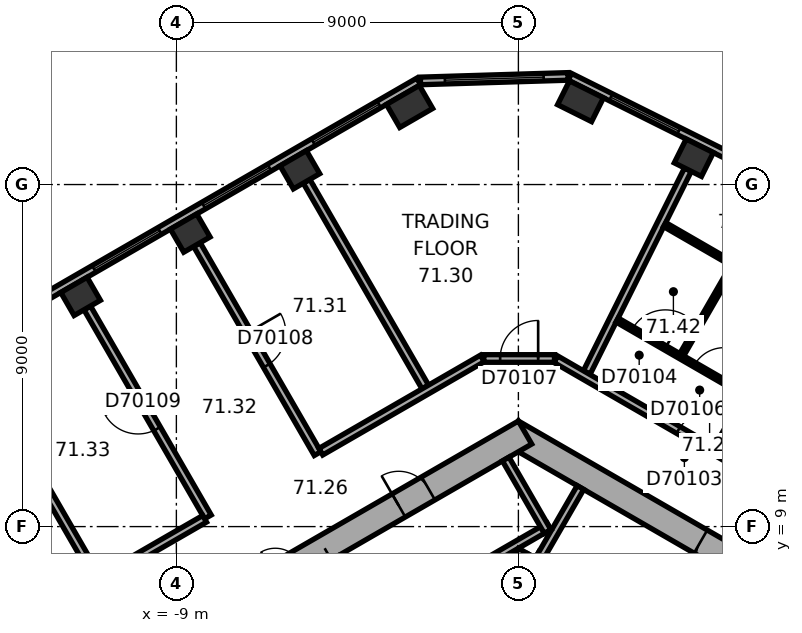
"""IFC4 building model, lengths in metres.
Left out: names, types, materials, properties, quantities, classifications, styles, units other than length and angle.
Written with IfcOpenShell. Run it as: python <this file> out.ifc"""

import sys

from ifc_helpers import new_model, si_unit, direction, frame, frame_2d, origin, origin_2d, place, context, subcontext, project, spatial, rectangle, extrude, element, fill, save


model = new_model("IFC4")
c1 = context("Model", 3, precision=1e-05, world=origin(), true_north=direction((0.0, 1.0)))
c2 = subcontext(c1, "Body", "Model", "MODEL_VIEW")
j1 = project(units=[si_unit("LENGTHUNIT", "METRE"), si_unit("PLANEANGLEUNIT", "RADIAN")], contexts=[c1])
p1 = place(None, origin())
s1 = spatial("IfcSite", under=j1, at=p1, CompositionType="ELEMENT")
p2 = place(p1, origin())
s2 = spatial("IfcBuilding", under=s1, at=p2, CompositionType="ELEMENT")
p3 = place(p2, frame((0.0, 0.0, 289.4)))
s3 = spatial("IfcBuildingStorey", under=s2, at=p3, CompositionType="ELEMENT", Elevation=289.4)
p4 = place(p3, frame((4.616, 18.706, 0.0), z_axis=(0.0, 0.0, 1.0), x_axis=(-0.894934361602, 0.44619781311, 0.0)))
e1 = element("IfcColumn", 1, at=p4, inside=s3, PredefinedType="COLUMN", context=c2, shape_type="SweptSolid", body=[
    extrude(rectangle(XDim=0.8, YDim=0.7, at=origin_2d()), origin(), (0.0, 0.0, 1.0), 3.7),
])
for number, where, z_axis, x_axis in (
    (2, (1.635, 20.192, 0.0), (0.0, 0.0, 1.0), (-0.895, 0.446, 0.0)),
    (3, (-2.864, 20.055, 0.0), (0.0, 0.0, 1.0), (-0.866, -0.5, 0.0)),
):
    element("IfcColumn", number, at=place(p3, frame(where, z_axis=z_axis, x_axis=x_axis)), inside=s3, PredefinedType="COLUMN", context=c2, shape_type="SweptSolid", body=[
        extrude(rectangle(XDim=1.0, YDim=0.7, at=origin_2d()), origin(), (0.0, 0.0, 1.0), 3.7),
    ])
for number, where, z_axis, x_axis in (
    (4, (-5.75, 18.389, 0.0), (0.0, 0.0, 1.0), (-0.866, -0.5, 0.0)),
    (5, (-8.635, 16.723, 0.0), (0.0, 0.0, 1.0), (-0.866, -0.5, 0.0)),
    (6, (-11.52, 15.057, 0.0), (0.0, 0.0, 1.0), (-0.866, -0.5, 0.0)),
):
    element("IfcColumn", number, at=place(p3, frame(where, z_axis=z_axis, x_axis=x_axis)), inside=s3, PredefinedType="COLUMN", context=c2, shape_type="SweptSolid", body=[
        extrude(rectangle(XDim=0.8, YDim=0.7, at=origin_2d()), origin(), (0.0, 0.0, 1.0), 3.7),
    ])
p5 = place(p3, frame((10.025, 5.586, 0.0), z_axis=(0.0, 0.0, 1.0), x_axis=(-0.866026453023, 0.499998182661, 0.0)))
e7 = element("IfcWall", 7, at=p5, inside=s3, PredefinedType="SHEAR", context=c2, shape_type="SweptSolid", body=[
    extrude(rectangle(XDim=11.778, YDim=0.7, at=frame_2d((5.889, 0.0))), origin(), (0.0, 0.0, 1.0), 3.7),
])
p6 = place(p5, frame((5.139, 0.0, 0.0)))
e8 = element("IfcOpeningElement", 8, at=p6, cuts=e7, PredefinedType="OPENING", context=c2, shape_type="SweptSolid", body=[
    extrude(rectangle(XDim=0.9, YDim=2.1, at=frame_2d((0.45, 1.05))), frame((0.0, 0.36, 0.0), z_axis=(0.0, -1.0, 0.0), x_axis=(1.0, 0.0, 0.0)), (0.0, 0.0, 1.0), 0.72),
])
p7 = place(p3, frame((0.175, 11.475, 0.0), z_axis=(0.0, 0.0, 1.0), x_axis=(-0.866026453023, -0.499998182661, 0.0)))
e9 = element("IfcWall", 9, at=p7, inside=s3, PredefinedType="SHEAR", context=c2, shape_type="SweptSolid", body=[
    extrude(rectangle(XDim=11.778, YDim=0.7, at=frame_2d((5.889, 0.0))), origin(), (0.0, 0.0, 1.0), 3.7),
])
p8 = place(p7, frame((6.089, 0.0, 0.0)))
e10 = element("IfcOpeningElement", 10, at=p8, cuts=e9, PredefinedType="OPENING", context=c2, shape_type="SweptSolid", body=[
    extrude(rectangle(XDim=1.5, YDim=2.1, at=frame_2d((0.75, 1.05))), frame((0.0, 0.36, 0.0), z_axis=(0.0, -1.0, 0.0), x_axis=(1.0, 0.0, 0.0)), (0.0, 0.0, 1.0), 0.72),
])
p9 = place(p7, frame((2.939, 0.0, 0.0)))
e11 = element("IfcOpeningElement", 11, at=p9, cuts=e9, PredefinedType="OPENING", context=c2, shape_type="SweptSolid", body=[
    extrude(rectangle(XDim=0.9, YDim=2.1, at=frame_2d((0.45, 1.05))), frame((0.0, 0.36, 0.0), z_axis=(0.0, -1.0, 0.0), x_axis=(1.0, 0.0, 0.0)), (0.0, 0.0, 1.0), 0.72),
])
p10 = place(p3, frame((17.223, 12.923, 0.0), z_axis=(0.0, 0.0, 1.0), x_axis=(-0.894930561148, 0.44620543556, 0.0)))
e12 = element("IfcWall", 12, at=p10, inside=s3, PredefinedType="STANDARD", context=c2, shape_type="SweptSolid", body=[
    extrude(rectangle(XDim=17.731, YDim=0.2, at=frame_2d((8.866, 0.0))), origin(), (0.0, 0.0, 1.0), 3.7),
])
p11 = place(p10, frame((1.202, 0.0, 0.9)))
e13 = element("IfcOpeningElement", 13, at=p11, cuts=e12, PredefinedType="OPENING", context=c2, shape_type="SweptSolid", body=[
    extrude(rectangle(XDim=2.0, YDim=2.0, at=frame_2d((1.0, 1.0))), frame((0.0, 0.11, 0.0), z_axis=(0.0, -1.0, 0.0), x_axis=(1.0, 0.0, 0.0)), (0.0, 0.0, 1.0), 0.22),
])
p12 = place(p10, frame((4.533, 0.0, 0.9)))
e14 = element("IfcOpeningElement", 14, at=p12, cuts=e12, PredefinedType="OPENING", context=c2, shape_type="SweptSolid", body=[
    extrude(rectangle(XDim=2.0, YDim=2.0, at=frame_2d((1.0, 1.0))), frame((0.0, 0.11, 0.0), z_axis=(0.0, -1.0, 0.0), x_axis=(1.0, 0.0, 0.0)), (0.0, 0.0, 1.0), 0.22),
])
p13 = place(p10, frame((7.865, 0.0, 0.9)))
e15 = element("IfcOpeningElement", 15, at=p13, cuts=e12, PredefinedType="OPENING", context=c2, shape_type="SweptSolid", body=[
    extrude(rectangle(XDim=2.0, YDim=2.0, at=frame_2d((1.0, 1.0))), frame((0.0, 0.11, 0.0), z_axis=(0.0, -1.0, 0.0), x_axis=(1.0, 0.0, 0.0)), (0.0, 0.0, 1.0), 0.22),
])
p14 = place(p10, frame((11.197, 0.0, 0.9)))
e16 = element("IfcOpeningElement", 16, at=p14, cuts=e12, PredefinedType="OPENING", context=c2, shape_type="SweptSolid", body=[
    extrude(rectangle(XDim=2.0, YDim=2.0, at=frame_2d((1.0, 1.0))), frame((0.0, 0.11, 0.0), z_axis=(0.0, -1.0, 0.0), x_axis=(1.0, 0.0, 0.0)), (0.0, 0.0, 1.0), 0.22),
])
p15 = place(p10, frame((14.528, 0.0, 0.9)))
e17 = element("IfcOpeningElement", 17, at=p15, cuts=e12, PredefinedType="OPENING", context=c2, shape_type="SweptSolid", body=[
    extrude(rectangle(XDim=2.0, YDim=2.0, at=frame_2d((1.0, 1.0))), frame((0.0, 0.11, 0.0), z_axis=(0.0, -1.0, 0.0), x_axis=(1.0, 0.0, 0.0)), (0.0, 0.0, 1.0), 0.22),
])
p16 = place(p3, frame((1.307, 20.845, 0.0), z_axis=(0.0, 0.0, 1.0), x_axis=(-0.999533654813, -0.030536419175, 0.0)))
e18 = element("IfcWall", 18, at=p16, inside=s3, PredefinedType="STANDARD", context=c2, shape_type="SweptSolid", body=[
    extrude(rectangle(XDim=3.885, YDim=0.2, at=frame_2d((1.943, 0.0))), origin(), (0.0, 0.0, 1.0), 3.7),
])
p17 = place(p16, frame((0.643, 0.0, 0.9)))
e19 = element("IfcOpeningElement", 19, at=p17, cuts=e18, PredefinedType="OPENING", context=c2, shape_type="SweptSolid", body=[
    extrude(rectangle(XDim=2.6, YDim=2.0, at=frame_2d((1.3, 1.0))), frame((0.0, 0.11, 0.0), z_axis=(0.0, -1.0, 0.0), x_axis=(1.0, 0.0, 0.0)), (0.0, 0.0, 1.0), 0.22),
])
p18 = place(p3, frame((-2.624, 20.713, 0.0), z_axis=(0.0, 0.0, 1.0), x_axis=(-0.866026460444, -0.499998169808, 0.0)))
e20 = element("IfcWall", 20, at=p18, inside=s3, PredefinedType="STANDARD", context=c2, shape_type="SweptSolid", body=[
    extrude(rectangle(XDim=17.731, YDim=0.2, at=frame_2d((8.866, 0.0))), origin(), (0.0, 0.0, 1.0), 3.7),
])
p19 = place(p18, frame((1.203, 0.0, 0.9)))
e21 = element("IfcOpeningElement", 21, at=p19, cuts=e20, PredefinedType="OPENING", context=c2, shape_type="SweptSolid", body=[
    extrude(rectangle(XDim=2.0, YDim=2.0, at=frame_2d((1.0, 1.0))), frame((0.0, 0.11, 0.0), z_axis=(0.0, -1.0, 0.0), x_axis=(1.0, 0.0, 0.0)), (0.0, 0.0, 1.0), 0.22),
])
p20 = place(p18, frame((4.535, 0.0, 0.9)))
e22 = element("IfcOpeningElement", 22, at=p20, cuts=e20, PredefinedType="OPENING", context=c2, shape_type="SweptSolid", body=[
    extrude(rectangle(XDim=2.0, YDim=2.0, at=frame_2d((1.0, 1.0))), frame((0.0, 0.11, 0.0), z_axis=(0.0, -1.0, 0.0), x_axis=(1.0, 0.0, 0.0)), (0.0, 0.0, 1.0), 0.22),
])
p21 = place(p18, frame((7.867, 0.0, 0.9)))
e23 = element("IfcOpeningElement", 23, at=p21, cuts=e20, PredefinedType="OPENING", context=c2, shape_type="SweptSolid", body=[
    extrude(rectangle(XDim=2.0, YDim=2.0, at=frame_2d((1.0, 1.0))), frame((0.0, 0.11, 0.0), z_axis=(0.0, -1.0, 0.0), x_axis=(1.0, 0.0, 0.0)), (0.0, 0.0, 1.0), 0.22),
])
p22 = place(p18, frame((11.198, 0.0, 0.9)))
e24 = element("IfcOpeningElement", 24, at=p22, cuts=e20, PredefinedType="OPENING", context=c2, shape_type="SweptSolid", body=[
    extrude(rectangle(XDim=2.0, YDim=2.0, at=frame_2d((1.0, 1.0))), frame((0.0, 0.11, 0.0), z_axis=(0.0, -1.0, 0.0), x_axis=(1.0, 0.0, 0.0)), (0.0, 0.0, 1.0), 0.22),
])
p23 = place(p18, frame((14.53, 0.0, 0.9)))
e25 = element("IfcOpeningElement", 25, at=p23, cuts=e20, PredefinedType="OPENING", context=c2, shape_type="SweptSolid", body=[
    extrude(rectangle(XDim=2.0, YDim=2.0, at=frame_2d((1.0, 1.0))), frame((0.0, 0.11, 0.0), z_axis=(0.0, -1.0, 0.0), x_axis=(1.0, 0.0, 0.0)), (0.0, 0.0, 1.0), 0.22),
])
p24 = place(p3, frame((7.424, 4.259, 0.0), z_axis=(0.0, 0.0, 1.0), x_axis=(-0.866026010844, 0.49999894854, 0.0)))
e26 = element("IfcWall", 26, at=p24, inside=s3, PredefinedType="PARTITIONING", context=c2, shape_type="SweptSolid", body=[
    extrude(rectangle(XDim=8.0, YDim=0.2, at=frame_2d((4.0, 0.0))), origin(), (0.0, 0.0, 1.0), 3.42),
])
p25 = place(p3, frame((0.532, 8.122, 0.0), z_axis=(0.0, 0.0, 1.0), x_axis=(0.500077893725, 0.86598042715, 0.0)))
e27 = element("IfcWall", 27, at=p25, inside=s3, PredefinedType="PARTITIONING", context=c2, shape_type="SweptSolid", body=[
    extrude(rectangle(XDim=2.2, YDim=0.2, at=frame_2d((1.1, 0.0))), origin(), (0.0, 0.0, 1.0), 3.42),
])
p26 = place(p3, frame((0.803, 9.009, 0.0), z_axis=(0.0, 0.0, 1.0), x_axis=(-0.866028230842, -0.499995103361, 0.0)))
e28 = element("IfcWall", 28, at=p26, inside=s3, PredefinedType="PARTITIONING", context=c2, shape_type="SweptSolid", body=[
    extrude(rectangle(XDim=5.4, YDim=0.2, at=frame_2d((2.7, 0.0))), origin(), (0.0, 0.0, 1.0), 3.42),
])
p27 = place(p3, frame((0.767, 8.872, 0.0), z_axis=(0.0, 0.0, 1.0), x_axis=(-0.499994660107, 0.866028486751, 0.0)))
e29 = element("IfcWall", 29, at=p27, inside=s3, PredefinedType="PARTITIONING", context=c2, shape_type="SweptSolid", body=[
    extrude(rectangle(XDim=2.2, YDim=0.2, at=frame_2d((1.1, 0.0))), origin(), (0.0, 0.0, 1.0), 3.42),
])
p28 = place(p3, frame((-2.216, 4.282, 0.0), z_axis=(0.0, 0.0, 1.0), x_axis=(0.499977259774, 0.866038532462, 0.0)))
e30 = element("IfcWall", 30, at=p28, inside=s3, PredefinedType="SHEAR", context=c2, shape_type="SweptSolid", body=[
    extrude(rectangle(XDim=4.7, YDim=0.3, at=frame_2d((2.35, 0.0))), origin(), (0.0, 0.0, 1.0), 3.42),
])
p29 = place(p3, frame((-14.23, 13.088, 0.0), z_axis=(0.0, 0.0, 1.0), x_axis=(0.500004234368, -0.866022959057, 0.0)))
e31 = element("IfcWall", 31, at=p29, inside=s3, PredefinedType="PARTITIONING", context=c2, shape_type="SweptSolid", body=[
    extrude(rectangle(XDim=6.25, YDim=0.2, at=frame_2d((3.125, 0.0))), origin(), (0.0, 0.0, 1.0), 3.42),
])
p30 = place(p3, frame((-11.345, 14.754, 0.0), z_axis=(0.0, 0.0, 1.0), x_axis=(0.500005339912, -0.866022320763, 0.0)))
e32 = element("IfcWall", 32, at=p30, inside=s3, PredefinedType="PARTITIONING", context=c2, shape_type="SweptSolid", body=[
    extrude(rectangle(XDim=6.35, YDim=0.2, at=frame_2d((3.175, 0.0))), origin(), (0.0, 0.0, 1.0), 3.42),
])
p31 = place(p30, frame((2.675, 0.0, 0.0)))
e33 = element("IfcOpeningElement", 33, at=p31, cuts=e32, PredefinedType="OPENING", context=c2, shape_type="SweptSolid", body=[
    extrude(rectangle(XDim=1.0, YDim=2.1, at=frame_2d((0.5, 1.05))), frame((0.0, 0.11, 0.0), z_axis=(0.0, -1.0, 0.0), x_axis=(1.0, 0.0, 0.0)), (0.0, 0.0, 1.0), 0.22),
])
p32 = place(p3, frame((-8.46, 16.42, 0.0), z_axis=(0.0, 0.0, 1.0), x_axis=(0.500005339912, -0.866022320763, 0.0)))
e34 = element("IfcWall", 34, at=p32, inside=s3, PredefinedType="PARTITIONING", context=c2, shape_type="SweptSolid", body=[
    extrude(rectangle(XDim=6.35, YDim=0.2, at=frame_2d((3.175, 0.0))), origin(), (0.0, 0.0, 1.0), 2.87),
])
p33 = place(p32, frame((2.675, 0.0, 0.0)))
e35 = element("IfcOpeningElement", 35, at=p33, cuts=e34, PredefinedType="OPENING", context=c2, shape_type="SweptSolid", body=[
    extrude(rectangle(XDim=1.0, YDim=2.1, at=frame_2d((0.5, 1.05))), frame((0.0, 0.11, 0.0), z_axis=(0.0, -1.0, 0.0), x_axis=(1.0, 0.0, 0.0)), (0.0, 0.0, 1.0), 0.22),
])
p34 = place(p3, frame((-8.257, 9.205, 0.0), z_axis=(0.0, 0.0, 1.0), x_axis=(-0.866030838723, -0.499990586292, 0.0)))
e36 = element("IfcWall", 36, at=p34, inside=s3, PredefinedType="PARTITIONING", context=c2, shape_type="SweptSolid", body=[
    extrude(rectangle(XDim=3.231, YDim=0.2, at=frame_2d((1.616, 0.0))), origin(), (0.0, 0.0, 1.0), 3.42),
])
p35 = place(p3, frame((-5.575, 18.086, 0.0), z_axis=(0.0, 0.0, 1.0), x_axis=(0.500004234368, -0.866022959057, 0.0)))
e37 = element("IfcWall", 37, at=p35, inside=s3, PredefinedType="PARTITIONING", context=c2, shape_type="SweptSolid", body=[
    extrude(rectangle(XDim=6.25, YDim=0.2, at=frame_2d((3.125, 0.0))), origin(), (0.0, 0.0, 1.0), 3.42),
])
p36 = place(p3, frame((-0.95, 13.423, 0.0), z_axis=(0.0, 0.0, 1.0), x_axis=(-0.86603557629, -0.499982380289, 0.0)))
e38 = element("IfcWall", 38, at=p36, inside=s3, PredefinedType="PARTITIONING", context=c2, shape_type="SweptSolid", body=[
    extrude(rectangle(XDim=4.906, YDim=0.2, at=frame_2d((2.453, 0.0))), origin(), (0.0, 0.0, 1.0), 3.42),
])
p37 = place(p3, frame((0.95, 13.423, 0.0), z_axis=(0.0, 0.0, 1.0), x_axis=(-1.0, 0.0, 0.0)))
e39 = element("IfcWall", 39, at=p37, inside=s3, PredefinedType="PARTITIONING", context=c2, shape_type="SweptSolid", body=[
    extrude(rectangle(XDim=1.86, YDim=0.2, at=frame_2d((0.93, 0.0))), origin(), (0.0, 0.0, 1.0), 3.42),
])
p38 = place(p37, frame((0.43, 0.0, 0.0)))
e40 = element("IfcOpeningElement", 40, at=p38, cuts=e39, PredefinedType="OPENING", context=c2, shape_type="SweptSolid", body=[
    extrude(rectangle(XDim=1.0, YDim=2.1, at=frame_2d((0.5, 1.05))), frame((0.0, 0.11, 0.0), z_axis=(0.0, -1.0, 0.0), x_axis=(1.0, 0.0, 0.0)), (0.0, 0.0, 1.0), 0.22),
])
p39 = place(p3, frame((4.299, 13.522, 0.0), z_axis=(0.0, 0.0, 1.0), x_axis=(0.499982138324, 0.866035715982, 0.0)))
e41 = element("IfcWall", 41, at=p39, inside=s3, PredefinedType="PARTITIONING", context=c2, shape_type="SweptSolid", body=[
    extrude(rectangle(XDim=2.74, YDim=0.12, at=frame_2d((1.37, 0.0))), origin(), (0.0, 0.0, 1.0), 3.42),
])
p40 = place(p3, frame((4.46, 18.392, 0.0), z_axis=(0.0, 0.0, 1.0), x_axis=(-0.446197360024, -0.894934587502, 0.0)))
e42 = element("IfcWall", 42, at=p40, inside=s3, PredefinedType="PARTITIONING", context=c2, shape_type="SweptSolid", body=[
    extrude(rectangle(XDim=5.96, YDim=0.2, at=frame_2d((2.98, 0.0))), origin(), (0.0, 0.0, 1.0), 2.87),
])
p41 = place(p3, frame((5.617, 15.925, 0.0), z_axis=(0.0, 0.0, 1.0), x_axis=(-0.866010195725, 0.500026340207, 0.0)))
e43 = element("IfcWall", 43, at=p41, inside=s3, PredefinedType="PARTITIONING", context=c2, shape_type="SweptSolid", body=[
    extrude(rectangle(XDim=2.04, YDim=0.12, at=frame_2d((1.02, 0.0))), origin(), (0.0, 0.0, 1.0), 3.42),
])
p42 = place(p3, frame((8.207, 11.197, 0.0), z_axis=(0.0, 0.0, 1.0), x_axis=(-0.866030514021, 0.499991148707, 0.0)))
e44 = element("IfcWall", 44, at=p42, inside=s3, PredefinedType="PARTITIONING", context=c2, shape_type="SweptSolid", body=[
    extrude(rectangle(XDim=6.476, YDim=0.12, at=frame_2d((3.238, 0.0))), origin(), (0.0, 0.0, 1.0), 3.42),
])
p43 = place(p42, frame((5.011, 0.0, 0.0)))
e45 = element("IfcOpeningElement", 45, at=p43, cuts=e44, PredefinedType="OPENING", context=c2, shape_type="SweptSolid", body=[
    extrude(rectangle(XDim=1.0, YDim=2.1, at=frame_2d((0.5, 1.05))), frame((0.0, 0.07, 0.0), z_axis=(0.0, -1.0, 0.0), x_axis=(1.0, 0.0, 0.0)), (0.0, 0.0, 1.0), 0.14),
])
p44 = place(p42, frame((0.95, 0.0, 0.0)))
e46 = element("IfcOpeningElement", 46, at=p44, cuts=e44, PredefinedType="OPENING", context=c2, shape_type="SweptSolid", body=[
    extrude(rectangle(XDim=0.9, YDim=2.1, at=frame_2d((0.45, 1.05))), frame((0.0, 0.07, 0.0), z_axis=(0.0, -1.0, 0.0), x_axis=(1.0, 0.0, 0.0)), (0.0, 0.0, 1.0), 0.14),
])
p45 = place(p42, frame((3.223, 0.0, 0.0)))
e47 = element("IfcOpeningElement", 47, at=p45, cuts=e44, PredefinedType="OPENING", context=c2, shape_type="SweptSolid", body=[
    extrude(rectangle(XDim=0.9, YDim=2.1, at=frame_2d((0.45, 1.05))), frame((0.0, 0.07, 0.0), z_axis=(0.0, -1.0, 0.0), x_axis=(1.0, 0.0, 0.0)), (0.0, 0.0, 1.0), 0.14),
])
p46 = place(p3, frame((10.934, 7.659, 0.0), z_axis=(0.0, 0.0, 1.0), x_axis=(-0.866030932647, 0.499990423607, 0.0)))
e48 = element("IfcWall", 48, at=p46, inside=s3, PredefinedType="PARTITIONING", context=c2, shape_type="SweptSolid", body=[
    extrude(rectangle(XDim=11.488, YDim=0.2, at=frame_2d((5.744, 0.0))), origin(), (0.0, 0.0, 1.0), 3.42),
])
p47 = place(p46, frame((6.764, 0.0, 0.0)))
e49 = element("IfcOpeningElement", 49, at=p47, cuts=e48, PredefinedType="OPENING", context=c2, shape_type="SweptSolid", body=[
    extrude(rectangle(XDim=1.0, YDim=2.1, at=frame_2d((0.5, 1.05))), frame((0.0, 0.11, 0.0), z_axis=(0.0, -1.0, 0.0), x_axis=(1.0, 0.0, 0.0)), (0.0, 0.0, 1.0), 0.22),
])
p48 = place(p15, origin())
e50 = element("IfcWindow", 50, at=p48, inside=s3, PartitioningType="SINGLE_PANEL", PredefinedType="WINDOW", context=c2, shape_type="SweptSolid", body=[
    extrude(rectangle(XDim=2.0, YDim=2.0, at=frame_2d((1.0, 1.0))), frame((0.0, 0.03, 0.0), z_axis=(0.0, -1.0, 0.0), x_axis=(1.0, 0.0, 0.0)), (0.0, 0.0, 1.0), 0.06),
])
fill(e17, e50)
p49 = place(p17, origin())
e51 = element("IfcWindow", 51, at=p49, inside=s3, PartitioningType="SINGLE_PANEL", PredefinedType="WINDOW", context=c2, shape_type="SweptSolid", body=[
    extrude(rectangle(XDim=2.6, YDim=2.0, at=frame_2d((1.3, 1.0))), frame((0.0, 0.03, 0.0), z_axis=(0.0, -1.0, 0.0), x_axis=(1.0, 0.0, 0.0)), (0.0, 0.0, 1.0), 0.06),
])
fill(e19, e51)
p50 = place(p19, origin())
e52 = element("IfcWindow", 52, at=p50, inside=s3, PartitioningType="SINGLE_PANEL", PredefinedType="WINDOW", context=c2, shape_type="SweptSolid", body=[
    extrude(rectangle(XDim=2.0, YDim=2.0, at=frame_2d((1.0, 1.0))), frame((0.0, 0.03, 0.0), z_axis=(0.0, -1.0, 0.0), x_axis=(1.0, 0.0, 0.0)), (0.0, 0.0, 1.0), 0.06),
])
fill(e21, e52)
p51 = place(p20, origin())
e53 = element("IfcWindow", 53, at=p51, inside=s3, PartitioningType="SINGLE_PANEL", PredefinedType="WINDOW", context=c2, shape_type="SweptSolid", body=[
    extrude(rectangle(XDim=2.0, YDim=2.0, at=frame_2d((1.0, 1.0))), frame((0.0, 0.03, 0.0), z_axis=(0.0, -1.0, 0.0), x_axis=(1.0, 0.0, 0.0)), (0.0, 0.0, 1.0), 0.06),
])
fill(e22, e53)
p52 = place(p21, origin())
e54 = element("IfcWindow", 54, at=p52, inside=s3, PartitioningType="SINGLE_PANEL", PredefinedType="WINDOW", context=c2, shape_type="SweptSolid", body=[
    extrude(rectangle(XDim=2.0, YDim=2.0, at=frame_2d((1.0, 1.0))), frame((0.0, 0.03, 0.0), z_axis=(0.0, -1.0, 0.0), x_axis=(1.0, 0.0, 0.0)), (0.0, 0.0, 1.0), 0.06),
])
fill(e23, e54)
p53 = place(p8, origin())
e55 = element("IfcDoor", 55, at=p53, inside=s3, OperationType="DOUBLE_DOOR_SINGLE_SWING", PredefinedType="DOOR", context=c2, shape_type="SweptSolid", body=[
    extrude(rectangle(XDim=1.5, YDim=2.1, at=frame_2d((0.75, 1.05))), frame((0.0, 0.025, 0.0), z_axis=(0.0, -1.0, 0.0), x_axis=(1.0, 0.0, 0.0)), (0.0, 0.0, 1.0), 0.05),
])
fill(e10, e55)
p54 = place(p6, origin())
e56 = element("IfcDoor", 56, at=p54, inside=s3, OperationType="SINGLE_SWING_LEFT", PredefinedType="DOOR", context=c2, shape_type="SweptSolid", body=[
    extrude(rectangle(XDim=0.9, YDim=2.1, at=frame_2d((0.45, 1.05))), frame((0.0, 0.025, 0.0), z_axis=(0.0, -1.0, 0.0), x_axis=(1.0, 0.0, 0.0)), (0.0, 0.0, 1.0), 0.05),
])
fill(e8, e56)
p55 = place(p9, origin())
e57 = element("IfcDoor", 57, at=p55, inside=s3, OperationType="SINGLE_SWING_LEFT", PredefinedType="DOOR", context=c2, shape_type="SweptSolid", body=[
    extrude(rectangle(XDim=0.9, YDim=2.1, at=frame_2d((0.45, 1.05))), frame((0.0, 0.025, 0.0), z_axis=(0.0, -1.0, 0.0), x_axis=(1.0, 0.0, 0.0)), (0.0, 0.0, 1.0), 0.05),
])
fill(e11, e57)
p56 = place(p47, origin())
e58 = element("IfcDoor", 58, at=p56, inside=s3, OperationType="SINGLE_SWING_LEFT", PredefinedType="DOOR", context=c2, shape_type="SweptSolid", body=[
    extrude(rectangle(XDim=1.0, YDim=2.1, at=frame_2d((0.5, 1.05))), frame((0.0, 0.025, 0.0), z_axis=(0.0, -1.0, 0.0), x_axis=(1.0, 0.0, 0.0)), (0.0, 0.0, 1.0), 0.05),
])
fill(e49, e58)
p57 = place(p43, origin())
e59 = element("IfcDoor", 59, at=p57, inside=s3, OperationType="SINGLE_SWING_LEFT", PredefinedType="DOOR", context=c2, shape_type="SweptSolid", body=[
    extrude(rectangle(XDim=1.0, YDim=2.1, at=frame_2d((0.5, 1.05))), frame((0.0, 0.025, 0.0), z_axis=(0.0, -1.0, 0.0), x_axis=(1.0, 0.0, 0.0)), (0.0, 0.0, 1.0), 0.05),
])
fill(e45, e59)
p58 = place(p45, origin())
e60 = element("IfcDoor", 60, at=p58, inside=s3, OperationType="SINGLE_SWING_LEFT", PredefinedType="DOOR", context=c2, shape_type="SweptSolid", body=[
    extrude(rectangle(XDim=0.9, YDim=2.1, at=frame_2d((0.45, 1.05))), frame((0.0, 0.025, 0.0), z_axis=(0.0, -1.0, 0.0), x_axis=(1.0, 0.0, 0.0)), (0.0, 0.0, 1.0), 0.05),
])
fill(e47, e60)
p59 = place(p38, origin())
e61 = element("IfcDoor", 61, at=p59, inside=s3, OperationType="SINGLE_SWING_LEFT", PredefinedType="DOOR", context=c2, shape_type="SweptSolid", body=[
    extrude(rectangle(XDim=1.0, YDim=2.1, at=frame_2d((0.5, 1.05))), frame((0.0, 0.025, 0.0), z_axis=(0.0, -1.0, 0.0), x_axis=(1.0, 0.0, 0.0)), (0.0, 0.0, 1.0), 0.05),
])
fill(e40, e61)
p60 = place(p33, origin())
e62 = element("IfcDoor", 62, at=p60, inside=s3, OperationType="SINGLE_SWING_LEFT", PredefinedType="DOOR", context=c2, shape_type="SweptSolid", body=[
    extrude(rectangle(XDim=1.0, YDim=2.1, at=frame_2d((0.5, 1.05))), frame((0.0, 0.025, 0.0), z_axis=(0.0, -1.0, 0.0), x_axis=(1.0, 0.0, 0.0)), (0.0, 0.0, 1.0), 0.05),
])
fill(e35, e62)
p61 = place(p31, origin())
e63 = element("IfcDoor", 63, at=p61, inside=s3, OperationType="SINGLE_SWING_LEFT", PredefinedType="DOOR", context=c2, shape_type="SweptSolid", body=[
    extrude(rectangle(XDim=1.0, YDim=2.1, at=frame_2d((0.5, 1.05))), frame((0.0, 0.025, 0.0), z_axis=(0.0, -1.0, 0.0), x_axis=(1.0, 0.0, 0.0)), (0.0, 0.0, 1.0), 0.05),
])
fill(e33, e63)
save(model, sys.argv[1])
